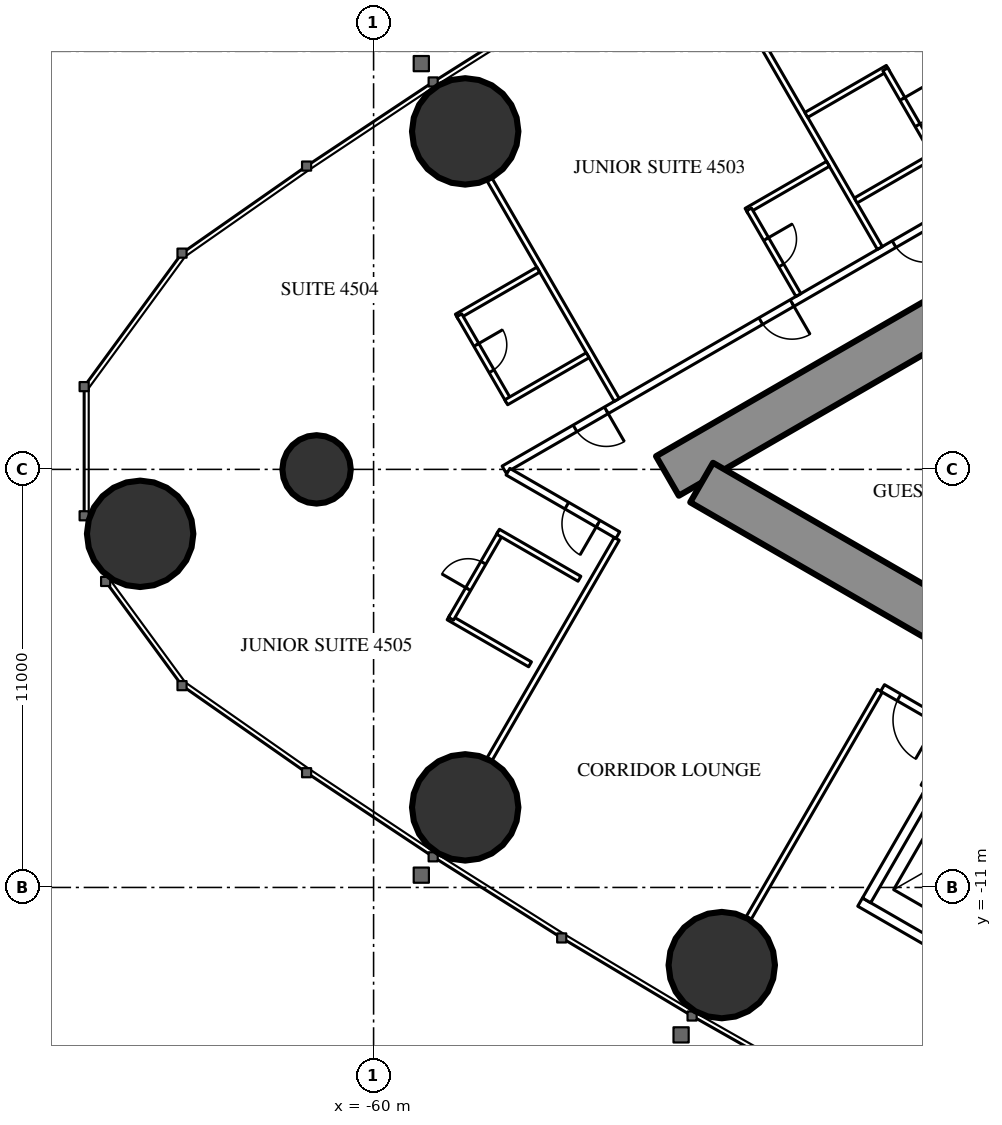
"""IFC4 building model, lengths in metres.
Left out: names, types, materials, properties, quantities, classifications, styles, units other than length and angle.
Written with IfcOpenShell. Run it as: python <this file> out.ifc"""

import sys

from ifc_helpers import new_model, si_unit, direction, frame, frame_2d, origin, origin_2d, place, context, subcontext, project, spatial, rectangle, circle, extrude, element, fill, save


model = new_model("IFC4")
c1 = context("Model", 3, precision=1e-05, world=origin(), true_north=direction((0.0, 1.0)))
c2 = subcontext(c1, "Body", "Model", "MODEL_VIEW")
j1 = project(units=[si_unit("LENGTHUNIT", "METRE"), si_unit("PLANEANGLEUNIT", "RADIAN")], contexts=[c1])
p1 = place(None, origin())
s1 = spatial("IfcSite", under=j1, at=p1, CompositionType="ELEMENT")
p2 = place(p1, origin())
s2 = spatial("IfcBuilding", under=s1, at=p2, CompositionType="ELEMENT")
p3 = place(p2, frame((0.0, 0.0, 170.3)))
s3 = spatial("IfcBuildingStorey", under=s2, at=p3, CompositionType="ELEMENT", Elevation=170.3)
for number, where, z_axis, x_axis in (
    (1, (-66.143, -1.695, 0.0), (0.0, 0.0, 1.0), (1.0, 0.0, 0.0)),
    (2, (-57.59, -8.893, 0.0), (0.0, 0.0, 1.0), (1.0, 0.0, 0.0)),
    (3, (-50.839, -13.043, 0.0), (0.0, 0.0, 1.0), (1.0, 0.0, 0.0)),
    (4, (-57.59, 8.893, 0.0), (0.0, 0.0, 1.0), (1.0, 0.0, 0.0)),
):
    element("IfcColumn", number, at=place(p3, frame(where, z_axis=z_axis, x_axis=x_axis)), inside=s3, PredefinedType="COLUMN", context=c2, shape_type="SweptSolid", body=[
        extrude(circle(Radius=1.4, at=origin_2d()), origin(), (0.0, 0.0, 1.0), 3.5),
    ])
p4 = place(p3, frame((-61.5, 0.0, 0.0), z_axis=(0.0, 0.0, 1.0), x_axis=(1.0, 0.0, 0.0)))
e5 = element("IfcColumn", 5, at=p4, inside=s3, PredefinedType="COLUMN", context=c2, shape_type="SweptSolid", body=[
    extrude(circle(Radius=0.9, at=origin_2d()), origin(), (0.0, 0.0, 1.0), 3.5),
])
p5 = place(p3, frame((-27.2, 14.3, 0.0), z_axis=(0.0, 0.0, 1.0), x_axis=(-0.866026593062, -0.499997940104, 0.0)))
e6 = element("IfcWall", 6, at=p5, inside=s3, PredefinedType="SHEAR", context=c2, shape_type="SweptSolid", body=[
    extrude(rectangle(XDim=28.946, YDim=1.2, at=frame_2d((14.473, 0.0))), origin(), (0.0, 0.0, 1.0), 3.5),
])
p6 = place(p5, frame((4.6, 0.0, 0.0)))
e7 = element("IfcOpeningElement", 7, at=p6, cuts=e6, PredefinedType="OPENING", context=c2, shape_type="SweptSolid", body=[
    extrude(rectangle(XDim=1.0, YDim=2.2, at=frame_2d((0.5, 1.1))), frame((0.0, 0.61, 0.0), z_axis=(0.0, -1.0, 0.0), x_axis=(1.0, 0.0, 0.0)), (0.0, 0.0, 1.0), 1.22),
])
p7 = place(p5, frame((13.395, 0.0, 0.0)))
e8 = element("IfcOpeningElement", 8, at=p7, cuts=e6, PredefinedType="OPENING", context=c2, shape_type="SweptSolid", body=[
    extrude(rectangle(XDim=1.8, YDim=2.2, at=frame_2d((0.9, 1.1))), frame((0.0, 0.61, 0.0), z_axis=(0.0, -1.0, 0.0), x_axis=(1.0, 0.0, 0.0)), (0.0, 0.0, 1.0), 1.22),
])
p8 = place(p3, frame((-27.2, -14.3, 0.0), z_axis=(0.0, 0.0, 1.0), x_axis=(-0.866024021859, 0.500002393557, 0.0)))
e9 = element("IfcWall", 9, at=p8, inside=s3, PredefinedType="SHEAR", context=c2, shape_type="SweptSolid", body=[
    extrude(rectangle(XDim=27.907, YDim=1.2, at=frame_2d((13.954, 0.0))), origin(), (0.0, 0.0, 1.0), 3.5),
])
p9 = place(p8, frame((4.6, 0.0, 0.0)))
e10 = element("IfcOpeningElement", 10, at=p9, cuts=e9, PredefinedType="OPENING", context=c2, shape_type="SweptSolid", body=[
    extrude(rectangle(XDim=1.0, YDim=2.2, at=frame_2d((0.5, 1.1))), frame((0.0, 0.61, 0.0), z_axis=(0.0, -1.0, 0.0), x_axis=(1.0, 0.0, 0.0)), (0.0, 0.0, 1.0), 1.22),
])
p10 = place(p8, frame((13.395, 0.0, 0.0)))
e11 = element("IfcOpeningElement", 11, at=p10, cuts=e9, PredefinedType="OPENING", context=c2, shape_type="SweptSolid", body=[
    extrude(rectangle(XDim=1.8, YDim=2.2, at=frame_2d((0.9, 1.1))), frame((0.0, 0.61, 0.0), z_axis=(0.0, -1.0, 0.0), x_axis=(1.0, 0.0, 0.0)), (0.0, 0.0, 1.0), 1.22),
])
p11 = place(p3, frame((-27.86, 16.575, 0.0), z_axis=(0.0, 0.0, 1.0), x_axis=(-0.866025533911, -0.499999774615, 0.0)))
e12 = element("IfcWall", 12, at=p11, inside=s3, PredefinedType="PARTITIONING", context=c2, shape_type="SweptSolid", body=[
    extrude(rectangle(XDim=33.149, YDim=0.2, at=frame_2d((16.575, 0.0))), origin(), (0.0, 0.0, 1.0), 3.25),
])
p12 = place(p11, frame((3.75, 0.0, 0.0)))
e13 = element("IfcOpeningElement", 13, at=p12, cuts=e12, PredefinedType="OPENING", context=c2, shape_type="SweptSolid", body=[
    extrude(rectangle(XDim=1.0, YDim=2.2, at=frame_2d((0.5, 1.1))), frame((0.0, 0.11, 0.0), z_axis=(0.0, -1.0, 0.0), x_axis=(1.0, 0.0, 0.0)), (0.0, 0.0, 1.0), 0.22),
])
p13 = place(p11, frame((20.347, 0.0, 0.0)))
e14 = element("IfcOpeningElement", 14, at=p13, cuts=e12, PredefinedType="OPENING", context=c2, shape_type="SweptSolid", body=[
    extrude(rectangle(XDim=0.95, YDim=2.2, at=frame_2d((0.475, 1.1))), frame((0.0, 0.11, 0.0), z_axis=(0.0, -1.0, 0.0), x_axis=(1.0, 0.0, 0.0)), (0.0, 0.0, 1.0), 0.22),
])
p14 = place(p11, frame((24.397, 0.0, 0.0)))
e15 = element("IfcOpeningElement", 15, at=p14, cuts=e12, PredefinedType="OPENING", context=c2, shape_type="SweptSolid", body=[
    extrude(rectangle(XDim=0.95, YDim=2.2, at=frame_2d((0.475, 1.1))), frame((0.0, 0.11, 0.0), z_axis=(0.0, -1.0, 0.0), x_axis=(1.0, 0.0, 0.0)), (0.0, 0.0, 1.0), 0.22),
])
p15 = place(p11, frame((30.042, 0.0, 0.0)))
e16 = element("IfcOpeningElement", 16, at=p15, cuts=e12, PredefinedType="OPENING", context=c2, shape_type="SweptSolid", body=[
    extrude(rectangle(XDim=0.95, YDim=2.2, at=frame_2d((0.475, 1.1))), frame((0.0, 0.11, 0.0), z_axis=(0.0, -1.0, 0.0), x_axis=(1.0, 0.0, 0.0)), (0.0, 0.0, 1.0), 0.22),
])
p16 = place(p3, frame((-46.679, 5.825, 0.0), z_axis=(0.0, 0.0, 1.0), x_axis=(-0.500006839597, 0.866021454905, 0.0)))
e17 = element("IfcWall", 17, at=p16, inside=s3, PredefinedType="PARTITIONING", context=c2, shape_type="SweptSolid", body=[
    extrude(rectangle(XDim=6.911, YDim=0.15, at=frame_2d((3.456, 0.0))), origin(), (0.0, 0.0, 1.0), 2.3),
])
p17 = place(p3, frame((-53.602, 1.828, 0.0), z_axis=(0.0, 0.0, 1.0), x_axis=(-0.49999191814, 0.866030069798, 0.0)))
e18 = element("IfcWall", 18, at=p17, inside=s3, PredefinedType="PARTITIONING", context=c2, shape_type="SweptSolid", body=[
    extrude(rectangle(XDim=6.692, YDim=0.15, at=frame_2d((3.346, 0.0))), origin(), (0.0, 0.0, 1.0), 2.3),
])
p18 = place(p3, frame((-46.679, -5.825, 0.0), z_axis=(0.0, 0.0, 1.0), x_axis=(-0.500006839597, -0.866021454905, 0.0)))
e19 = element("IfcWall", 19, at=p18, inside=s3, PredefinedType="PARTITIONING", context=c2, shape_type="SweptSolid", body=[
    extrude(rectangle(XDim=6.911, YDim=0.15, at=frame_2d((3.456, 0.0))), origin(), (0.0, 0.0, 1.0), 2.3),
])
p19 = place(p3, frame((-53.602, -1.828, 0.0), z_axis=(0.0, 0.0, 1.0), x_axis=(-0.49999191814, -0.866030069798, 0.0)))
e20 = element("IfcWall", 20, at=p19, inside=s3, PredefinedType="PARTITIONING", context=c2, shape_type="SweptSolid", body=[
    extrude(rectangle(XDim=6.692, YDim=0.15, at=frame_2d((3.346, 0.0))), origin(), (0.0, 0.0, 1.0), 2.3),
])
p20 = place(p3, frame((-44.652, -6.764, 0.0), z_axis=(0.0, 0.0, 1.0), x_axis=(-0.485424724123, -0.874278466629, 0.0)))
e21 = element("IfcWall", 21, at=p20, inside=s3, PredefinedType="PARTITIONING", context=c2, shape_type="SweptSolid", body=[
    extrude(rectangle(XDim=1.805, YDim=0.15, at=frame_2d((0.903, 0.0))), origin(), (0.0, 0.0, 1.0), 3.25),
])
p21 = place(p3, frame((-44.715, -6.844, 0.0), z_axis=(0.0, 0.0, 1.0), x_axis=(-0.865999496279, 0.500044870432, 0.0)))
e22 = element("IfcWall", 22, at=p21, inside=s3, PredefinedType="PARTITIONING", context=c2, shape_type="SweptSolid", body=[
    extrude(rectangle(XDim=2.185, YDim=0.2, at=frame_2d((1.092, 0.0))), origin(), (0.0, 0.0, 1.0), 3.25),
])
p22 = place(p21, frame((0.5, 0.0, 0.0)))
e23 = element("IfcOpeningElement", 23, at=p22, cuts=e22, PredefinedType="OPENING", context=c2, shape_type="SweptSolid", body=[
    extrude(rectangle(XDim=1.185, YDim=2.2, at=frame_2d((0.593, 1.1))), frame((0.0, 0.11, 0.0), z_axis=(0.0, -1.0, 0.0), x_axis=(1.0, 0.0, 0.0)), (0.0, 0.0, 1.0), 0.22),
])
p23 = place(p3, frame((-53.574, -1.729, 0.0), z_axis=(0.0, 0.0, 1.0), x_axis=(-0.866019930389, 0.500009480079, 0.0)))
e24 = element("IfcWall", 24, at=p23, inside=s3, PredefinedType="PARTITIONING", context=c2, shape_type="SweptSolid", body=[
    extrude(rectangle(XDim=3.338, YDim=0.2, at=frame_2d((1.669, 0.0))), origin(), (0.0, 0.0, 1.0), 3.25),
])
p24 = place(p23, frame((0.6, 0.0, 0.0)))
e25 = element("IfcOpeningElement", 25, at=p24, cuts=e24, PredefinedType="OPENING", context=c2, shape_type="SweptSolid", body=[
    extrude(rectangle(XDim=0.95, YDim=2.2, at=frame_2d((0.475, 1.1))), frame((0.0, 0.11, 0.0), z_axis=(0.0, -1.0, 0.0), x_axis=(1.0, 0.0, 0.0)), (0.0, 0.0, 1.0), 0.22),
])
p25 = place(p3, frame((-46.47, 10.564, 0.0), z_axis=(0.0, 0.0, 1.0), x_axis=(-0.866006523861, -0.500032699561, 0.0)))
e26 = element("IfcWall", 26, at=p25, inside=s3, PredefinedType="PARTITIONING", context=c2, shape_type="SweptSolid", body=[
    extrude(rectangle(XDim=2.475, YDim=0.15, at=frame_2d((1.237, 0.0))), origin(), (0.0, 0.0, 1.0), 3.25),
])
p26 = place(p3, frame((-45.235, 8.275, 0.0), z_axis=(0.0, 0.0, 1.0), x_axis=(-0.500006934395, 0.866021400173, 0.0)))
e27 = element("IfcWall", 27, at=p26, inside=s3, PredefinedType="PARTITIONING", context=c2, shape_type="SweptSolid", body=[
    extrude(rectangle(XDim=2.6, YDim=0.15, at=frame_2d((1.3, 0.0))), origin(), (0.0, 0.0, 1.0), 3.25),
])
p27 = place(p26, frame((0.9, 0.0, 0.0)))
e28 = element("IfcOpeningElement", 28, at=p27, cuts=e27, PredefinedType="OPENING", context=c2, shape_type="SweptSolid", body=[
    extrude(rectangle(XDim=0.8, YDim=2.2, at=frame_2d((0.4, 1.1))), frame((0.0, 0.085, 0.0), z_axis=(0.0, -1.0, 0.0), x_axis=(1.0, 0.0, 0.0)), (0.0, 0.0, 1.0), 0.17),
])
for number, where, z_axis, x_axis in (
    (29, (-45.17, 8.312, 0.0), (0.0, 0.0, 1.0), (-0.866, -0.5, 0.0)),
    (30, (-48.044, 8.039, 0.0), (0.0, 0.0, 1.0), (-0.866, -0.5, 0.0)),
):
    element("IfcWall", number, at=place(p3, frame(where, z_axis=z_axis, x_axis=x_axis)), inside=s3, PredefinedType="PARTITIONING", context=c2, shape_type="SweptSolid", body=[
        extrude(rectangle(XDim=2.475, YDim=0.15, at=frame_2d((1.238, 0.0))), origin(), (0.0, 0.0, 1.0), 3.25),
    ])
p28 = place(p3, frame((-48.822, 4.588, 0.0), z_axis=(0.0, 0.0, 1.0), x_axis=(-0.500006934395, 0.866021400173, 0.0)))
e31 = element("IfcWall", 31, at=p28, inside=s3, PredefinedType="PARTITIONING", context=c2, shape_type="SweptSolid", body=[
    extrude(rectangle(XDim=2.6, YDim=0.15, at=frame_2d((1.3, 0.0))), origin(), (0.0, 0.0, 1.0), 3.25),
])
p29 = place(p28, frame((0.9, 0.0, 0.0)))
e32 = element("IfcOpeningElement", 32, at=p29, cuts=e31, PredefinedType="OPENING", context=c2, shape_type="SweptSolid", body=[
    extrude(rectangle(XDim=0.8, YDim=2.2, at=frame_2d((0.4, 1.1))), frame((0.0, 0.085, 0.0), z_axis=(0.0, -1.0, 0.0), x_axis=(1.0, 0.0, 0.0)), (0.0, 0.0, 1.0), 0.17),
])
p30 = place(p3, frame((-55.667, 5.255, 0.0), z_axis=(0.0, 0.0, 1.0), x_axis=(-0.866006523861, -0.500032699561, 0.0)))
e33 = element("IfcWall", 33, at=p30, inside=s3, PredefinedType="PARTITIONING", context=c2, shape_type="SweptSolid", body=[
    extrude(rectangle(XDim=2.475, YDim=0.15, at=frame_2d((1.237, 0.0))), origin(), (0.0, 0.0, 1.0), 3.25),
])
p31 = place(p3, frame((-56.446, 1.803, 0.0), z_axis=(0.0, 0.0, 1.0), x_axis=(-0.499936506574, 0.866062058628, 0.0)))
e34 = element("IfcWall", 34, at=p31, inside=s3, PredefinedType="PARTITIONING", context=c2, shape_type="SweptSolid", body=[
    extrude(rectangle(XDim=2.6, YDim=0.15, at=frame_2d((1.3, 0.0))), origin(), (0.0, 0.0, 1.0), 3.25),
])
p32 = place(p31, frame((0.9, 0.0, 0.0)))
e35 = element("IfcOpeningElement", 35, at=p32, cuts=e34, PredefinedType="OPENING", context=c2, shape_type="SweptSolid", body=[
    extrude(rectangle(XDim=0.8, YDim=2.2, at=frame_2d((0.4, 1.1))), frame((0.0, 0.085, 0.0), z_axis=(0.0, -1.0, 0.0), x_axis=(1.0, 0.0, 0.0)), (0.0, 0.0, 1.0), 0.17),
])
p33 = place(p3, frame((-54.367, 3.003, 0.0), z_axis=(0.0, 0.0, 1.0), x_axis=(-0.866031185235, -0.4999899861, 0.0)))
e36 = element("IfcWall", 36, at=p33, inside=s3, PredefinedType="PARTITIONING", context=c2, shape_type="SweptSolid", body=[
    extrude(rectangle(XDim=2.475, YDim=0.15, at=frame_2d((1.238, 0.0))), origin(), (0.0, 0.0, 1.0), 3.25),
])
p34 = place(p3, frame((-55.884, -5.13, 0.0), z_axis=(0.0, 0.0, 1.0), x_axis=(-0.866006523861, 0.500032699561, 0.0)))
e37 = element("IfcWall", 37, at=p34, inside=s3, PredefinedType="PARTITIONING", context=c2, shape_type="SweptSolid", body=[
    extrude(rectangle(XDim=2.475, YDim=0.15, at=frame_2d((1.237, 0.0))), origin(), (0.0, 0.0, 1.0), 3.25),
])
p35 = place(p3, frame((-56.662, -1.678, 0.0), z_axis=(0.0, 0.0, 1.0), x_axis=(-0.500006934395, -0.866021400173, 0.0)))
e38 = element("IfcWall", 38, at=p35, inside=s3, PredefinedType="PARTITIONING", context=c2, shape_type="SweptSolid", body=[
    extrude(rectangle(XDim=2.6, YDim=0.15, at=frame_2d((1.3, 0.0))), origin(), (0.0, 0.0, 1.0), 3.25),
])
p36 = place(p35, frame((0.9, 0.0, 0.0)))
e39 = element("IfcOpeningElement", 39, at=p36, cuts=e38, PredefinedType="OPENING", context=c2, shape_type="SweptSolid", body=[
    extrude(rectangle(XDim=0.8, YDim=2.2, at=frame_2d((0.4, 1.1))), frame((0.0, 0.085, 0.0), z_axis=(0.0, -1.0, 0.0), x_axis=(1.0, 0.0, 0.0)), (0.0, 0.0, 1.0), 0.17),
])
p37 = place(p3, frame((-54.583, -2.878, 0.0), z_axis=(0.0, 0.0, 1.0), x_axis=(-0.866006523861, 0.500032699561, 0.0)))
e40 = element("IfcWall", 40, at=p37, inside=s3, PredefinedType="PARTITIONING", context=c2, shape_type="SweptSolid", body=[
    extrude(rectangle(XDim=2.475, YDim=0.15, at=frame_2d((1.237, 0.0))), origin(), (0.0, 0.0, 1.0), 3.25),
])
p38 = place(p3, frame((-41.482, -14.686, 0.0), z_axis=(0.0, 0.0, 1.0), x_axis=(-0.86603344179, 0.499986077507, 0.0)))
e41 = element("IfcWall", 41, at=p38, inside=s3, PredefinedType="PARTITIONING", context=c2, shape_type="SweptSolid", body=[
    extrude(rectangle(XDim=6.6, YDim=0.25, at=frame_2d((3.3, 0.0))), origin(), (0.0, 0.0, 1.0), 3.25),
])
p39 = place(p3, frame((-45.428, -8.568, 0.0), z_axis=(0.0, 0.0, 1.0), x_axis=(-0.499929347863, -0.866066190972, 0.0)))
e42 = element("IfcWall", 42, at=p39, inside=s3, PredefinedType="PARTITIONING", context=c2, shape_type="SweptSolid", body=[
    extrude(rectangle(XDim=3.201, YDim=0.25, at=frame_2d((1.6, 0.0))), origin(), (0.0, 0.0, 1.0), 3.25),
])
p40 = place(p27, origin())
e43 = element("IfcDoor", 43, at=p40, inside=s3, OperationType="SINGLE_SWING_RIGHT", PredefinedType="DOOR", context=c2, shape_type="SweptSolid", body=[
    extrude(rectangle(XDim=0.8, YDim=2.2, at=frame_2d((0.4, 1.1))), frame((0.0, 0.025, 0.0), z_axis=(0.0, -1.0, 0.0), x_axis=(1.0, 0.0, 0.0)), (0.0, 0.0, 1.0), 0.05),
])
fill(e28, e43)
p41 = place(p13, origin())
e44 = element("IfcDoor", 44, at=p41, inside=s3, OperationType="SINGLE_SWING_LEFT", PredefinedType="DOOR", context=c2, shape_type="SweptSolid", body=[
    extrude(rectangle(XDim=0.95, YDim=2.2, at=frame_2d((0.475, 1.1))), frame((0.0, 0.025, 0.0), z_axis=(0.0, -1.0, 0.0), x_axis=(1.0, 0.0, 0.0)), (0.0, 0.0, 1.0), 0.05),
])
fill(e14, e44)
p42 = place(p29, origin())
e45 = element("IfcDoor", 45, at=p42, inside=s3, OperationType="SINGLE_SWING_RIGHT", PredefinedType="DOOR", context=c2, shape_type="SweptSolid", body=[
    extrude(rectangle(XDim=0.8, YDim=2.2, at=frame_2d((0.4, 1.1))), frame((0.0, 0.025, 0.0), z_axis=(0.0, -1.0, 0.0), x_axis=(1.0, 0.0, 0.0)), (0.0, 0.0, 1.0), 0.05),
])
fill(e32, e45)
p43 = place(p14, origin())
e46 = element("IfcDoor", 46, at=p43, inside=s3, OperationType="SINGLE_SWING_LEFT", PredefinedType="DOOR", context=c2, shape_type="SweptSolid", body=[
    extrude(rectangle(XDim=0.95, YDim=2.2, at=frame_2d((0.475, 1.1))), frame((0.0, 0.025, 0.0), z_axis=(0.0, -1.0, 0.0), x_axis=(1.0, 0.0, 0.0)), (0.0, 0.0, 1.0), 0.05),
])
fill(e15, e46)
p44 = place(p32, origin())
e47 = element("IfcDoor", 47, at=p44, inside=s3, OperationType="SINGLE_SWING_RIGHT", PredefinedType="DOOR", context=c2, shape_type="SweptSolid", body=[
    extrude(rectangle(XDim=0.8, YDim=2.2, at=frame_2d((0.4, 1.1))), frame((0.0, 0.025, 0.0), z_axis=(0.0, -1.0, 0.0), x_axis=(1.0, 0.0, 0.0)), (0.0, 0.0, 1.0), 0.05),
])
fill(e35, e47)
p45 = place(p15, origin())
e48 = element("IfcDoor", 48, at=p45, inside=s3, OperationType="SINGLE_SWING_LEFT", PredefinedType="DOOR", context=c2, shape_type="SweptSolid", body=[
    extrude(rectangle(XDim=0.95, YDim=2.2, at=frame_2d((0.475, 1.1))), frame((0.0, 0.025, 0.0), z_axis=(0.0, -1.0, 0.0), x_axis=(1.0, 0.0, 0.0)), (0.0, 0.0, 1.0), 0.05),
])
fill(e16, e48)
p46 = place(p36, origin())
e49 = element("IfcDoor", 49, at=p46, inside=s3, OperationType="SINGLE_SWING_RIGHT", PredefinedType="DOOR", context=c2, shape_type="SweptSolid", body=[
    extrude(rectangle(XDim=0.8, YDim=2.2, at=frame_2d((0.4, 1.1))), frame((0.0, 0.025, 0.0), z_axis=(0.0, -1.0, 0.0), x_axis=(1.0, 0.0, 0.0)), (0.0, 0.0, 1.0), 0.05),
])
fill(e39, e49)
p47 = place(p24, origin())
e50 = element("IfcDoor", 50, at=p47, inside=s3, OperationType="SINGLE_SWING_LEFT", PredefinedType="DOOR", context=c2, shape_type="SweptSolid", body=[
    extrude(rectangle(XDim=0.95, YDim=2.2, at=frame_2d((0.475, 1.1))), frame((0.0, 0.025, 0.0), z_axis=(0.0, -1.0, 0.0), x_axis=(1.0, 0.0, 0.0)), (0.0, 0.0, 1.0), 0.05),
])
fill(e25, e50)
p48 = place(p22, origin())
e51 = element("IfcDoor", 51, at=p48, inside=s3, OperationType="SINGLE_SWING_LEFT", PredefinedType="DOOR", context=c2, shape_type="SweptSolid", body=[
    extrude(rectangle(XDim=1.185, YDim=2.2, at=frame_2d((0.593, 1.1))), frame((0.0, 0.025, 0.0), z_axis=(0.0, -1.0, 0.0), x_axis=(1.0, 0.0, 0.0)), (0.0, 0.0, 1.0), 0.05),
])
fill(e23, e51)
save(model, sys.argv[1])
